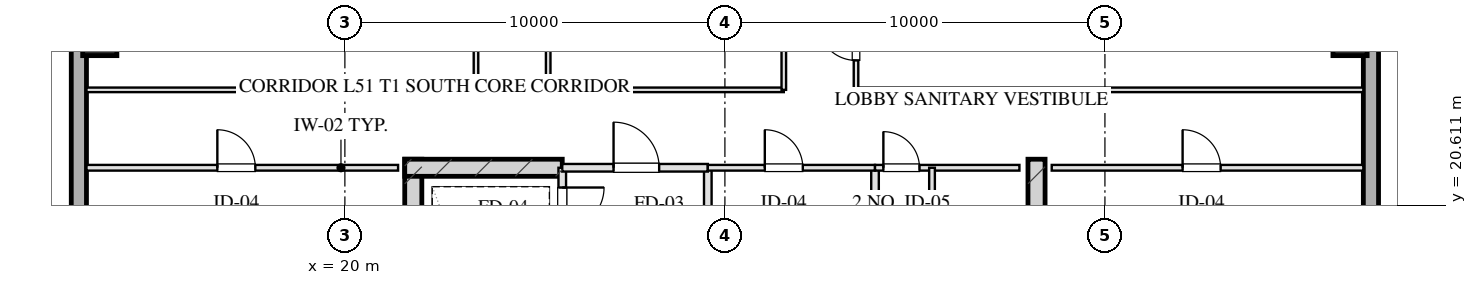
"""IFC4 building model, lengths in metres.
Left out: names, types, materials, properties, quantities, classifications, styles, units other than length and angle.
Written with IfcOpenShell. Run it as: python <this file> out.ifc"""

import sys

from ifc_helpers import new_model, si_unit, direction, frame, frame_2d, origin, origin_2d, place, context, subcontext, project, spatial, rectangle, hollow_rectangle, extrude, element, fill, save


model = new_model("IFC4")
c1 = context("Model", 3, precision=1e-05, world=origin(), true_north=direction((0.0, 1.0)))
c2 = subcontext(c1, "Body", "Model", "MODEL_VIEW")
j1 = project(units=[si_unit("LENGTHUNIT", "METRE"), si_unit("PLANEANGLEUNIT", "RADIAN")], contexts=[c1])
p1 = place(None, origin())
s1 = spatial("IfcSite", under=j1, at=p1, CompositionType="ELEMENT")
p2 = place(p1, origin())
s2 = spatial("IfcBuilding", under=s1, at=p2, CompositionType="ELEMENT")
p3 = place(p2, frame((0.0, 0.0, 192.05)))
s3 = spatial("IfcBuildingStorey", under=s2, at=p3, CompositionType="ELEMENT", Elevation=192.05)
for number, where, z_axis, x_axis in (
    (1, (21.8, 21.825, 0.0), (0.0, 0.0, 1.0), (0.0, -1.0, 0.0)),
    (2, (38.2, 21.825, 0.0), (0.0, 0.0, 1.0), (0.0, -1.0, 0.0)),
):
    element("IfcWall", number, at=place(p3, frame(where, z_axis=z_axis, x_axis=x_axis)), inside=s3, PredefinedType="SHEAR", context=c2, shape_type="SweptSolid", body=[
        extrude(rectangle(XDim=9.33, YDim=0.45, at=frame_2d((4.665, 0.0))), origin(), (0.0, 0.0, 1.0), 3.45),
    ])
p4 = place(p3, frame((21.575, 21.6, 0.0), z_axis=(0.0, 0.0, 1.0), x_axis=(1.0, 0.0, 0.0)))
e3 = element("IfcWall", 3, at=p4, inside=s3, PredefinedType="SHEAR", context=c2, shape_type="SweptSolid", body=[
    extrude(rectangle(XDim=4.145, YDim=0.45, at=frame_2d((2.073, 0.0))), origin(), (0.0, 0.0, 1.0), 3.45),
])
for number, where, z_axis, x_axis in (
    (4, (13.55, 25.0, 0.0), (0.0, 0.0, 1.0), (1.0, 0.0, 0.0)),
    (5, (46.45, 25.0, 0.0), (0.0, 0.0, 1.0), (1.0, 0.0, 0.0)),
):
    element("IfcColumn", number, at=place(p3, frame(where, z_axis=z_axis, x_axis=x_axis)), inside=s3, PredefinedType="COLUMN", context=c2, shape_type="SweptSolid", body=[
        extrude(hollow_rectangle(XDim=0.9, YDim=0.9, WallThickness=0.032, at=origin_2d()), origin(), (0.0, 0.0, 1.0), 3.451),
    ])
p5 = place(p3, frame((13.0, 10.8, 0.0), z_axis=(0.0, 0.0, 1.0), x_axis=(0.0, 1.0, 0.0)))
e6 = element("IfcWall", 6, at=p5, inside=s3, PredefinedType="SOLIDWALL", context=c2, shape_type="SweptSolid", body=[
    extrude(rectangle(XDim=46.4, YDim=0.4, at=frame_2d((23.2, 0.0))), origin(), (0.0, 0.0, 1.0), 2.61),
])
p6 = place(p5, frame((15.75, 0.0, 0.75)))
e7 = element("IfcOpeningElement", 7, at=p6, cuts=e6, PredefinedType="OPENING", context=c2, shape_type="SweptSolid", body=[
    extrude(rectangle(XDim=2.1, YDim=1.46, at=frame_2d((1.05, 0.73))), frame((0.0, 0.21, 0.0), z_axis=(0.0, -1.0, 0.0), x_axis=(1.0, 0.0, 0.0)), (0.0, 0.0, 1.0), 0.42),
])
p7 = place(p5, frame((19.55, 0.0, 0.75)))
e8 = element("IfcOpeningElement", 8, at=p7, cuts=e6, PredefinedType="OPENING", context=c2, shape_type="SweptSolid", body=[
    extrude(rectangle(XDim=2.1, YDim=1.46, at=frame_2d((1.05, 0.73))), frame((0.0, 0.21, 0.0), z_axis=(0.0, -1.0, 0.0), x_axis=(1.0, 0.0, 0.0)), (0.0, 0.0, 1.0), 0.42),
])
p8 = place(p5, frame((24.75, 0.0, 0.75)))
e9 = element("IfcOpeningElement", 9, at=p8, cuts=e6, PredefinedType="OPENING", context=c2, shape_type="SweptSolid", body=[
    extrude(rectangle(XDim=2.1, YDim=1.46, at=frame_2d((1.05, 0.73))), frame((0.0, 0.21, 0.0), z_axis=(0.0, -1.0, 0.0), x_axis=(1.0, 0.0, 0.0)), (0.0, 0.0, 1.0), 0.42),
])
p9 = place(p5, frame((28.55, 0.0, 0.75)))
e10 = element("IfcOpeningElement", 10, at=p9, cuts=e6, PredefinedType="OPENING", context=c2, shape_type="SweptSolid", body=[
    extrude(rectangle(XDim=2.1, YDim=1.46, at=frame_2d((1.05, 0.73))), frame((0.0, 0.21, 0.0), z_axis=(0.0, -1.0, 0.0), x_axis=(1.0, 0.0, 0.0)), (0.0, 0.0, 1.0), 0.42),
])
p10 = place(p3, frame((47.0, 57.2, 0.0), z_axis=(0.0, 0.0, 1.0), x_axis=(0.0, -1.0, 0.0)))
e11 = element("IfcWall", 11, at=p10, inside=s3, PredefinedType="SOLIDWALL", context=c2, shape_type="SweptSolid", body=[
    extrude(rectangle(XDim=46.4, YDim=0.4, at=frame_2d((23.2, 0.0))), origin(), (0.0, 0.0, 1.0), 2.61),
])
p11 = place(p10, frame((28.55, 0.0, 0.75)))
e12 = element("IfcOpeningElement", 12, at=p11, cuts=e11, PredefinedType="OPENING", context=c2, shape_type="SweptSolid", body=[
    extrude(rectangle(XDim=2.1, YDim=1.46, at=frame_2d((1.05, 0.73))), frame((0.0, 0.21, 0.0), z_axis=(0.0, -1.0, 0.0), x_axis=(1.0, 0.0, 0.0)), (0.0, 0.0, 1.0), 0.42),
])
p12 = place(p10, frame((24.75, 0.0, 0.75)))
e13 = element("IfcOpeningElement", 13, at=p12, cuts=e11, PredefinedType="OPENING", context=c2, shape_type="SweptSolid", body=[
    extrude(rectangle(XDim=2.1, YDim=1.46, at=frame_2d((1.05, 0.73))), frame((0.0, 0.21, 0.0), z_axis=(0.0, -1.0, 0.0), x_axis=(1.0, 0.0, 0.0)), (0.0, 0.0, 1.0), 0.42),
])
p13 = place(p10, frame((19.55, 0.0, 0.75)))
e14 = element("IfcOpeningElement", 14, at=p13, cuts=e11, PredefinedType="OPENING", context=c2, shape_type="SweptSolid", body=[
    extrude(rectangle(XDim=2.1, YDim=1.46, at=frame_2d((1.05, 0.73))), frame((0.0, 0.21, 0.0), z_axis=(0.0, -1.0, 0.0), x_axis=(1.0, 0.0, 0.0)), (0.0, 0.0, 1.0), 0.42),
])
p14 = place(p10, frame((15.75, 0.0, 0.75)))
e15 = element("IfcOpeningElement", 15, at=p14, cuts=e11, PredefinedType="OPENING", context=c2, shape_type="SweptSolid", body=[
    extrude(rectangle(XDim=2.1, YDim=1.46, at=frame_2d((1.05, 0.73))), frame((0.0, 0.21, 0.0), z_axis=(0.0, -1.0, 0.0), x_axis=(1.0, 0.0, 0.0)), (0.0, 0.0, 1.0), 0.42),
])
p15 = place(p3, frame((25.72, 21.6, 0.0), z_axis=(0.0, 0.0, 1.0), x_axis=(0.0, -1.0, 0.0)))
e16 = element("IfcWall", 16, at=p15, inside=s3, PredefinedType="PARTITIONING", context=c2, shape_type="SweptSolid", body=[
    extrude(rectangle(XDim=1.9, YDim=0.2, at=frame_2d((0.95, 0.0))), origin(), (0.0, 0.0, 1.0), 3.175),
])
p16 = place(p15, frame((0.52, 0.0, 0.0)))
e17 = element("IfcOpeningElement", 17, at=p16, cuts=e16, PredefinedType="OPENING", context=c2, shape_type="SweptSolid", body=[
    extrude(rectangle(XDim=1.1, YDim=2.05, at=frame_2d((0.55, 1.025))), frame((0.0, 0.11, 0.0), z_axis=(0.0, -1.0, 0.0), x_axis=(1.0, 0.0, 0.0)), (0.0, 0.0, 1.0), 0.22),
])
p17 = place(p3, frame((29.55, 21.6, 0.0), z_axis=(0.0, 0.0, 1.0), x_axis=(0.0, -1.0, 0.0)))
e18 = element("IfcWall", 18, at=p17, inside=s3, PredefinedType="PARTITIONING", context=c2, shape_type="SweptSolid", body=[
    extrude(rectangle(XDim=8.43, YDim=0.2, at=frame_2d((4.215, 0.0))), origin(), (0.0, 0.0, 1.0), 3.175),
])
p18 = place(p3, frame((25.72, 21.6, 0.0), z_axis=(0.0, 0.0, 1.0), x_axis=(1.0, 0.0, 0.0)))
e19 = element("IfcWall", 19, at=p18, inside=s3, PredefinedType="PARTITIONING", context=c2, shape_type="SweptSolid", body=[
    extrude(rectangle(XDim=3.83, YDim=0.2, at=frame_2d((1.915, 0.0))), origin(), (0.0, 0.0, 1.0), 3.175),
])
p19 = place(p18, frame((1.35, 0.0, 0.0)))
e20 = element("IfcOpeningElement", 20, at=p19, cuts=e19, PredefinedType="OPENING", context=c2, shape_type="SweptSolid", body=[
    extrude(rectangle(XDim=1.2, YDim=2.05, at=frame_2d((0.6, 1.025))), frame((0.0, 0.11, 0.0), z_axis=(0.0, -1.0, 0.0), x_axis=(1.0, 0.0, 0.0)), (0.0, 0.0, 1.0), 0.22),
])
p20 = place(p3, frame((33.95, 21.6, 0.0), z_axis=(0.0, 0.0, 1.0), x_axis=(0.0, -1.0, 0.0)))
e21 = element("IfcWall", 21, at=p20, inside=s3, PredefinedType="PARTITIONING", context=c2, shape_type="SweptSolid", body=[
    extrude(rectangle(XDim=8.43, YDim=0.2, at=frame_2d((4.215, 0.0))), origin(), (0.0, 0.0, 1.0), 3.175),
])
p21 = place(p3, frame((29.55, 21.6, 0.0), z_axis=(0.0, 0.0, 1.0), x_axis=(1.0, 0.0, 0.0)))
e22 = element("IfcWall", 22, at=p21, inside=s3, PredefinedType="PARTITIONING", context=c2, shape_type="SweptSolid", body=[
    extrude(rectangle(XDim=4.4, YDim=0.15, at=frame_2d((2.2, 0.0))), origin(), (0.0, 0.0, 1.0), 3.175),
])
p22 = place(p21, frame((1.5, 0.0, 0.0)))
e23 = element("IfcOpeningElement", 23, at=p22, cuts=e22, PredefinedType="OPENING", context=c2, shape_type="SweptSolid", body=[
    extrude(rectangle(XDim=1.0, YDim=2.05, at=frame_2d((0.5, 1.025))), frame((0.0, 0.085, 0.0), z_axis=(0.0, -1.0, 0.0), x_axis=(1.0, 0.0, 0.0)), (0.0, 0.0, 1.0), 0.17),
])
p23 = place(p3, frame((33.95, 21.6, 0.0), z_axis=(0.0, 0.0, 1.0), x_axis=(1.0, 0.0, 0.0)))
e24 = element("IfcWall", 24, at=p23, inside=s3, PredefinedType="PARTITIONING", context=c2, shape_type="SweptSolid", body=[
    extrude(rectangle(XDim=3.8, YDim=0.15, at=frame_2d((1.9, 0.0))), origin(), (0.0, 0.0, 1.0), 3.175),
])
p24 = place(p23, frame((0.22, 0.0, 0.0)))
e25 = element("IfcOpeningElement", 25, at=p24, cuts=e24, PredefinedType="OPENING", context=c2, shape_type="SweptSolid", body=[
    extrude(rectangle(XDim=0.95, YDim=2.05, at=frame_2d((0.475, 1.025))), frame((0.0, 0.085, 0.0), z_axis=(0.0, -1.0, 0.0), x_axis=(1.0, 0.0, 0.0)), (0.0, 0.0, 1.0), 0.17),
])
p25 = place(p3, frame((35.45, 21.6, 0.0), z_axis=(0.0, 0.0, 1.0), x_axis=(0.0, -1.0, 0.0)))
e26 = element("IfcWall", 26, at=p25, inside=s3, PredefinedType="PARTITIONING", context=c2, shape_type="SweptSolid", body=[
    extrude(rectangle(XDim=8.43, YDim=0.15, at=frame_2d((4.215, 0.0))), origin(), (0.0, 0.0, 1.0), 2.815),
])
p26 = place(p25, frame((2.55, 0.0, 0.0)))
e27 = element("IfcOpeningElement", 27, at=p26, cuts=e26, PredefinedType="OPENING", context=c2, shape_type="SweptSolid", body=[
    extrude(rectangle(XDim=0.95, YDim=2.05, at=frame_2d((0.475, 1.025))), frame((0.0, 0.085, 0.0), z_axis=(0.0, -1.0, 0.0), x_axis=(1.0, 0.0, 0.0)), (0.0, 0.0, 1.0), 0.17),
])
p27 = place(p25, frame((4.7, 0.0, 0.0)))
e28 = element("IfcOpeningElement", 28, at=p27, cuts=e26, PredefinedType="OPENING", context=c2, shape_type="SweptSolid", body=[
    extrude(rectangle(XDim=0.9, YDim=2.05, at=frame_2d((0.45, 1.025))), frame((0.0, 0.085, 0.0), z_axis=(0.0, -1.0, 0.0), x_axis=(1.0, 0.0, 0.0)), (0.0, 0.0, 1.0), 0.17),
])
p28 = place(p25, frame((6.8, 0.0, 0.0)))
e29 = element("IfcOpeningElement", 29, at=p28, cuts=e26, PredefinedType="OPENING", context=c2, shape_type="SweptSolid", body=[
    extrude(rectangle(XDim=0.9, YDim=2.05, at=frame_2d((0.45, 1.025))), frame((0.0, 0.085, 0.0), z_axis=(0.0, -1.0, 0.0), x_axis=(1.0, 0.0, 0.0)), (0.0, 0.0, 1.0), 0.17),
])
p29 = place(p3, frame((13.2, 21.6, 0.0), z_axis=(0.0, 0.0, 1.0), x_axis=(1.0, 0.0, 0.0)))
e30 = element("IfcWall", 30, at=p29, inside=s3, PredefinedType="PARTITIONING", context=c2, shape_type="SweptSolid", body=[
    extrude(rectangle(XDim=8.2, YDim=0.15, at=frame_2d((4.1, 0.0))), origin(), (0.0, 0.0, 1.0), 3.175),
])
p30 = place(p29, frame((3.444, 0.0, 0.0)))
e31 = element("IfcOpeningElement", 31, at=p30, cuts=e30, PredefinedType="OPENING", context=c2, shape_type="SweptSolid", body=[
    extrude(rectangle(XDim=1.0, YDim=2.05, at=frame_2d((0.5, 1.025))), frame((0.0, 0.085, 0.0), z_axis=(0.0, -1.0, 0.0), x_axis=(1.0, 0.0, 0.0)), (0.0, 0.0, 1.0), 0.17),
])
p31 = place(p3, frame((38.6, 21.6, 0.0), z_axis=(0.0, 0.0, 1.0), x_axis=(1.0, 0.0, 0.0)))
e32 = element("IfcWall", 32, at=p31, inside=s3, PredefinedType="PARTITIONING", context=c2, shape_type="SweptSolid", body=[
    extrude(rectangle(XDim=8.2, YDim=0.15, at=frame_2d((4.1, 0.0))), origin(), (0.0, 0.0, 1.0), 3.175),
])
p32 = place(p31, frame((3.444, 0.0, 0.0)))
e33 = element("IfcOpeningElement", 33, at=p32, cuts=e32, PredefinedType="OPENING", context=c2, shape_type="SweptSolid", body=[
    extrude(rectangle(XDim=1.0, YDim=2.05, at=frame_2d((0.5, 1.025))), frame((0.0, 0.085, 0.0), z_axis=(0.0, -1.0, 0.0), x_axis=(1.0, 0.0, 0.0)), (0.0, 0.0, 1.0), 0.17),
])
p33 = place(p3, frame((13.2, 23.65, 0.0), z_axis=(0.0, 0.0, 1.0), x_axis=(1.0, 0.0, 0.0)))
e34 = element("IfcWall", 34, at=p33, inside=s3, PredefinedType="PARTITIONING", context=c2, shape_type="SweptSolid", body=[
    extrude(rectangle(XDim=10.25, YDim=0.12, at=frame_2d((5.125, 0.0))), origin(), (0.0, 0.0, 1.0), 3.175),
])
p34 = place(p3, frame((25.35, 23.65, 0.0), z_axis=(0.0, 0.0, 1.0), x_axis=(1.0, 0.0, 0.0)))
e35 = element("IfcWall", 35, at=p34, inside=s3, PredefinedType="PARTITIONING", context=c2, shape_type="SweptSolid", body=[
    extrude(rectangle(XDim=6.2, YDim=0.12, at=frame_2d((3.1, 0.0))), origin(), (0.0, 0.0, 1.0), 3.175),
])
p35 = place(p3, frame((33.45, 23.65, 0.0), z_axis=(0.0, 0.0, 1.0), x_axis=(1.0, 0.0, 0.0)))
e36 = element("IfcWall", 36, at=p35, inside=s3, PredefinedType="PARTITIONING", context=c2, shape_type="SweptSolid", body=[
    extrude(rectangle(XDim=13.35, YDim=0.12, at=frame_2d((6.675, 0.0))), origin(), (0.0, 0.0, 1.0), 3.175),
])
p36 = place(p3, frame((23.45, 23.65, 0.0), z_axis=(0.0, 0.0, 1.0), x_axis=(0.0, 1.0, 0.0)))
e37 = element("IfcWall", 37, at=p36, inside=s3, PredefinedType="PARTITIONING", context=c2, shape_type="SweptSolid", body=[
    extrude(rectangle(XDim=20.7, YDim=0.12, at=frame_2d((10.35, 0.0))), origin(), (0.0, 0.0, 1.0), 3.175),
])
p37 = place(p36, frame((2.175, 0.0, 0.0)))
e38 = element("IfcOpeningElement", 38, at=p37, cuts=e37, PredefinedType="OPENING", context=c2, shape_type="SweptSolid", body=[
    extrude(rectangle(XDim=1.0, YDim=2.05, at=frame_2d((0.5, 1.025))), frame((0.0, 0.07, 0.0), z_axis=(0.0, -1.0, 0.0), x_axis=(1.0, 0.0, 0.0)), (0.0, 0.0, 1.0), 0.14),
])
p38 = place(p36, frame((6.883, 0.0, 0.0)))
e39 = element("IfcOpeningElement", 39, at=p38, cuts=e37, PredefinedType="OPENING", context=c2, shape_type="SweptSolid", body=[
    extrude(rectangle(XDim=1.0, YDim=2.05, at=frame_2d((0.5, 1.025))), frame((0.0, 0.07, 0.0), z_axis=(0.0, -1.0, 0.0), x_axis=(1.0, 0.0, 0.0)), (0.0, 0.0, 1.0), 0.14),
])
p39 = place(p36, frame((11.502, 0.0, 0.0)))
e40 = element("IfcOpeningElement", 40, at=p39, cuts=e37, PredefinedType="OPENING", context=c2, shape_type="SweptSolid", body=[
    extrude(rectangle(XDim=1.0, YDim=2.05, at=frame_2d((0.5, 1.025))), frame((0.0, 0.07, 0.0), z_axis=(0.0, -1.0, 0.0), x_axis=(1.0, 0.0, 0.0)), (0.0, 0.0, 1.0), 0.14),
])
p40 = place(p36, frame((17.145, 0.0, 0.0)))
e41 = element("IfcOpeningElement", 41, at=p40, cuts=e37, PredefinedType="OPENING", context=c2, shape_type="SweptSolid", body=[
    extrude(rectangle(XDim=1.0, YDim=2.05, at=frame_2d((0.5, 1.025))), frame((0.0, 0.07, 0.0), z_axis=(0.0, -1.0, 0.0), x_axis=(1.0, 0.0, 0.0)), (0.0, 0.0, 1.0), 0.14),
])
p41 = place(p3, frame((25.35, 23.65, 0.0), z_axis=(0.0, 0.0, 1.0), x_axis=(0.0, 1.0, 0.0)))
e42 = element("IfcWall", 42, at=p41, inside=s3, PredefinedType="PARTITIONING", context=c2, shape_type="SweptSolid", body=[
    extrude(rectangle(XDim=20.7, YDim=0.12, at=frame_2d((10.35, 0.0))), origin(), (0.0, 0.0, 1.0), 3.175),
])
p42 = place(p41, frame((4.963, 0.0, 0.0)))
e43 = element("IfcOpeningElement", 43, at=p42, cuts=e42, PredefinedType="OPENING", context=c2, shape_type="SweptSolid", body=[
    extrude(rectangle(XDim=1.1, YDim=2.05, at=frame_2d((0.55, 1.025))), frame((0.0, 0.07, 0.0), z_axis=(0.0, -1.0, 0.0), x_axis=(1.0, 0.0, 0.0)), (0.0, 0.0, 1.0), 0.14),
])
p43 = place(p41, frame((15.382, 0.0, 0.0)))
e44 = element("IfcOpeningElement", 44, at=p43, cuts=e42, PredefinedType="OPENING", context=c2, shape_type="SweptSolid", body=[
    extrude(rectangle(XDim=1.1, YDim=2.05, at=frame_2d((0.55, 1.025))), frame((0.0, 0.07, 0.0), z_axis=(0.0, -1.0, 0.0), x_axis=(1.0, 0.0, 0.0)), (0.0, 0.0, 1.0), 0.14),
])
p44 = place(p3, frame((31.55, 23.65, 0.0), z_axis=(0.0, 0.0, 1.0), x_axis=(0.0, 1.0, 0.0)))
e45 = element("IfcWall", 45, at=p44, inside=s3, PredefinedType="PARTITIONING", context=c2, shape_type="SweptSolid", body=[
    extrude(rectangle(XDim=20.7, YDim=0.12, at=frame_2d((10.35, 0.0))), origin(), (0.0, 0.0, 1.0), 3.175),
])
p45 = place(p3, frame((33.45, 23.65, 0.0), z_axis=(0.0, 0.0, 1.0), x_axis=(0.0, 1.0, 0.0)))
e46 = element("IfcWall", 46, at=p45, inside=s3, PredefinedType="PARTITIONING", context=c2, shape_type="SweptSolid", body=[
    extrude(rectangle(XDim=20.7, YDim=0.12, at=frame_2d((10.35, 0.0))), origin(), (0.0, 0.0, 1.0), 3.175),
])
p46 = place(p45, frame((0.775, 0.0, 0.0)))
e47 = element("IfcOpeningElement", 47, at=p46, cuts=e46, PredefinedType="OPENING", context=c2, shape_type="SweptSolid", body=[
    extrude(rectangle(XDim=1.0, YDim=2.05, at=frame_2d((0.5, 1.025))), frame((0.0, 0.07, 0.0), z_axis=(0.0, -1.0, 0.0), x_axis=(1.0, 0.0, 0.0)), (0.0, 0.0, 1.0), 0.14),
])
p47 = place(p45, frame((5.35, 0.0, 0.0)))
e48 = element("IfcOpeningElement", 48, at=p47, cuts=e46, PredefinedType="OPENING", context=c2, shape_type="SweptSolid", body=[
    extrude(rectangle(XDim=1.0, YDim=2.05, at=frame_2d((0.5, 1.025))), frame((0.0, 0.07, 0.0), z_axis=(0.0, -1.0, 0.0), x_axis=(1.0, 0.0, 0.0)), (0.0, 0.0, 1.0), 0.14),
])
p48 = place(p45, frame((9.85, 0.0, 0.0)))
e49 = element("IfcOpeningElement", 49, at=p48, cuts=e46, PredefinedType="OPENING", context=c2, shape_type="SweptSolid", body=[
    extrude(rectangle(XDim=1.0, YDim=2.05, at=frame_2d((0.5, 1.025))), frame((0.0, 0.07, 0.0), z_axis=(0.0, -1.0, 0.0), x_axis=(1.0, 0.0, 0.0)), (0.0, 0.0, 1.0), 0.14),
])
p49 = place(p45, frame((12.95, 0.0, 0.0)))
e50 = element("IfcOpeningElement", 50, at=p49, cuts=e46, PredefinedType="OPENING", context=c2, shape_type="SweptSolid", body=[
    extrude(rectangle(XDim=1.0, YDim=2.05, at=frame_2d((0.5, 1.025))), frame((0.0, 0.07, 0.0), z_axis=(0.0, -1.0, 0.0), x_axis=(1.0, 0.0, 0.0)), (0.0, 0.0, 1.0), 0.14),
])
p50 = place(p45, frame((17.525, 0.0, 0.0)))
e51 = element("IfcOpeningElement", 51, at=p50, cuts=e46, PredefinedType="OPENING", context=c2, shape_type="SweptSolid", body=[
    extrude(rectangle(XDim=1.0, YDim=2.05, at=frame_2d((0.5, 1.025))), frame((0.0, 0.07, 0.0), z_axis=(0.0, -1.0, 0.0), x_axis=(1.0, 0.0, 0.0)), (0.0, 0.0, 1.0), 0.14),
])
p51 = place(p16, origin())
e52 = element("IfcDoor", 52, at=p51, inside=s3, OperationType="SINGLE_SWING_LEFT", PredefinedType="DOOR", context=c2, shape_type="SweptSolid", body=[
    extrude(rectangle(XDim=1.1, YDim=2.05, at=frame_2d((0.55, 1.025))), frame((0.0, 0.025, 0.0), z_axis=(0.0, -1.0, 0.0), x_axis=(1.0, 0.0, 0.0)), (0.0, 0.0, 1.0), 0.05),
])
fill(e17, e52)
p52 = place(p19, origin())
e53 = element("IfcDoor", 53, at=p52, inside=s3, OperationType="SINGLE_SWING_LEFT", PredefinedType="DOOR", context=c2, shape_type="SweptSolid", body=[
    extrude(rectangle(XDim=1.2, YDim=2.05, at=frame_2d((0.6, 1.025))), frame((0.0, 0.025, 0.0), z_axis=(0.0, -1.0, 0.0), x_axis=(1.0, 0.0, 0.0)), (0.0, 0.0, 1.0), 0.05),
])
fill(e20, e53)
p53 = place(p22, origin())
e54 = element("IfcDoor", 54, at=p53, inside=s3, OperationType="SINGLE_SWING_LEFT", PredefinedType="DOOR", context=c2, shape_type="SweptSolid", body=[
    extrude(rectangle(XDim=1.0, YDim=2.05, at=frame_2d((0.5, 1.025))), frame((0.0, 0.025, 0.0), z_axis=(0.0, -1.0, 0.0), x_axis=(1.0, 0.0, 0.0)), (0.0, 0.0, 1.0), 0.05),
])
fill(e23, e54)
p54 = place(p24, origin())
e55 = element("IfcDoor", 55, at=p54, inside=s3, OperationType="SINGLE_SWING_LEFT", PredefinedType="DOOR", context=c2, shape_type="SweptSolid", body=[
    extrude(rectangle(XDim=0.95, YDim=2.05, at=frame_2d((0.475, 1.025))), frame((0.0, 0.025, 0.0), z_axis=(0.0, -1.0, 0.0), x_axis=(1.0, 0.0, 0.0)), (0.0, 0.0, 1.0), 0.05),
])
fill(e25, e55)
p55 = place(p30, origin())
e56 = element("IfcDoor", 56, at=p55, inside=s3, OperationType="SINGLE_SWING_LEFT", PredefinedType="DOOR", context=c2, shape_type="SweptSolid", body=[
    extrude(rectangle(XDim=1.0, YDim=2.05, at=frame_2d((0.5, 1.025))), frame((0.0, 0.025, 0.0), z_axis=(0.0, -1.0, 0.0), x_axis=(1.0, 0.0, 0.0)), (0.0, 0.0, 1.0), 0.05),
])
fill(e31, e56)
p56 = place(p32, origin())
e57 = element("IfcDoor", 57, at=p56, inside=s3, OperationType="SINGLE_SWING_LEFT", PredefinedType="DOOR", context=c2, shape_type="SweptSolid", body=[
    extrude(rectangle(XDim=1.0, YDim=2.05, at=frame_2d((0.5, 1.025))), frame((0.0, 0.025, 0.0), z_axis=(0.0, -1.0, 0.0), x_axis=(1.0, 0.0, 0.0)), (0.0, 0.0, 1.0), 0.05),
])
fill(e33, e57)
p57 = place(p46, origin())
e58 = element("IfcDoor", 58, at=p57, inside=s3, OperationType="SINGLE_SWING_RIGHT", PredefinedType="DOOR", context=c2, shape_type="SweptSolid", body=[
    extrude(rectangle(XDim=1.0, YDim=2.05, at=frame_2d((0.5, 1.025))), frame((0.0, 0.025, 0.0), z_axis=(0.0, -1.0, 0.0), x_axis=(1.0, 0.0, 0.0)), (0.0, 0.0, 1.0), 0.05),
])
fill(e47, e58)
save(model, sys.argv[1])
